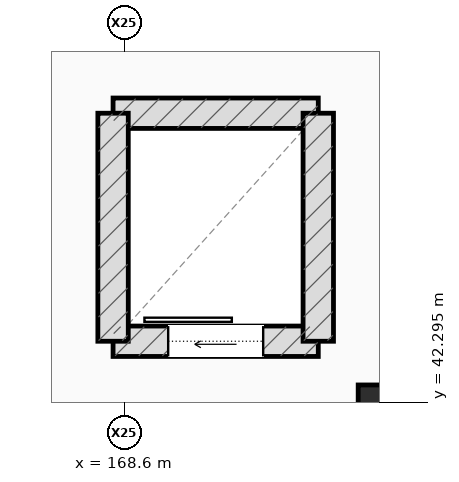
"""IFC4 building model, lengths in metres.
Left out: names, types, materials, properties, quantities, classifications, styles, units other than length and angle.
Written with IfcOpenShell. Run it as: python <this file> out.ifc"""

import sys

from ifc_helpers import new_model, si_unit, direction, frame, frame_2d, origin, origin_2d, place, context, subcontext, project, spatial, rectangle, extrude, element, fill, save


model = new_model("IFC4")
c1 = context("Model", 3, precision=1e-05, world=origin(), true_north=direction((0.0, 1.0)))
c2 = subcontext(c1, "Body", "Model", "MODEL_VIEW")
j1 = project(units=[si_unit("LENGTHUNIT", "METRE"), si_unit("PLANEANGLEUNIT", "RADIAN")], contexts=[c1])
p1 = place(None, origin())
s1 = spatial("IfcSite", under=j1, at=p1, CompositionType="ELEMENT")
p2 = place(p1, origin())
s2 = spatial("IfcBuilding", under=s1, at=p2, CompositionType="ELEMENT")
p3 = place(p2, frame((0.0, 0.0, 14.4)))
s3 = spatial("IfcBuildingStorey", under=s2, at=p3, CompositionType="ELEMENT", Elevation=14.4)
p4 = place(p3, frame((172.0, 42.2, 0.0), z_axis=(0.0, 0.0, 1.0), x_axis=(1.0, 0.0, 0.0)))
e1 = element("IfcColumn", 1, at=p4, inside=s3, PredefinedType="COLUMN", context=c2, shape_type="SweptSolid", body=[
    extrude(rectangle(XDim=0.65, YDim=0.65, at=origin_2d()), origin(), (0.0, 0.0, 1.0), 4.2),
])
p5 = place(p3, frame((168.45, 43.1, 0.0), z_axis=(0.0, 0.0, 1.0), x_axis=(1.0, 0.0, 0.0)))
e2 = element("IfcWall", 2, at=p5, inside=s3, PredefinedType="SHEAR", context=c2, shape_type="SweptSolid", body=[
    extrude(rectangle(XDim=2.7, YDim=0.4, at=frame_2d((1.35, 0.0))), origin(), (0.0, 0.0, 1.0), 4.005),
])
p6 = place(p5, frame((0.725, 0.0, 0.0)))
e3 = element("IfcOpeningElement", 3, at=p6, cuts=e2, PredefinedType="OPENING", context=c2, shape_type="SweptSolid", body=[
    extrude(rectangle(XDim=1.25, YDim=2.2, at=frame_2d((0.625, 1.1))), frame((0.0, 0.21, 0.0), z_axis=(0.0, -1.0, 0.0), x_axis=(1.0, 0.0, 0.0)), (0.0, 0.0, 1.0), 0.42),
])
p7 = place(p3, frame((168.45, 46.1, 0.0), z_axis=(0.0, 0.0, 1.0), x_axis=(1.0, 0.0, 0.0)))
e4 = element("IfcWall", 4, at=p7, inside=s3, PredefinedType="SHEAR", context=c2, shape_type="SweptSolid", body=[
    extrude(rectangle(XDim=2.7, YDim=0.4, at=frame_2d((1.35, 0.0))), origin(), (0.0, 0.0, 1.0), 4.005),
])
for number, where, z_axis, x_axis in (
    (5, (168.45, 43.1, 0.0), (0.0, 0.0, 1.0), (0.0, 1.0, 0.0)),
    (6, (171.15, 43.1, 0.0), (0.0, 0.0, 1.0), (0.0, 1.0, 0.0)),
):
    element("IfcWall", number, at=place(p3, frame(where, z_axis=z_axis, x_axis=x_axis)), inside=s3, PredefinedType="SHEAR", context=c2, shape_type="SweptSolid", body=[
        extrude(rectangle(XDim=3.0, YDim=0.4, at=frame_2d((1.5, 0.0))), origin(), (0.0, 0.0, 1.0), 4.005),
    ])
p8 = place(p6, origin())
e7 = element("IfcDoor", 7, at=p8, inside=s3, OperationType="SLIDING_TO_LEFT", PredefinedType="DOOR", context=c2, shape_type="SweptSolid", body=[
    extrude(rectangle(XDim=1.25, YDim=2.2, at=frame_2d((0.625, 1.1))), frame((0.0, 0.025, 0.0), z_axis=(0.0, -1.0, 0.0), x_axis=(1.0, 0.0, 0.0)), (0.0, 0.0, 1.0), 0.05),
])
fill(e3, e7)
save(model, sys.argv[1])
